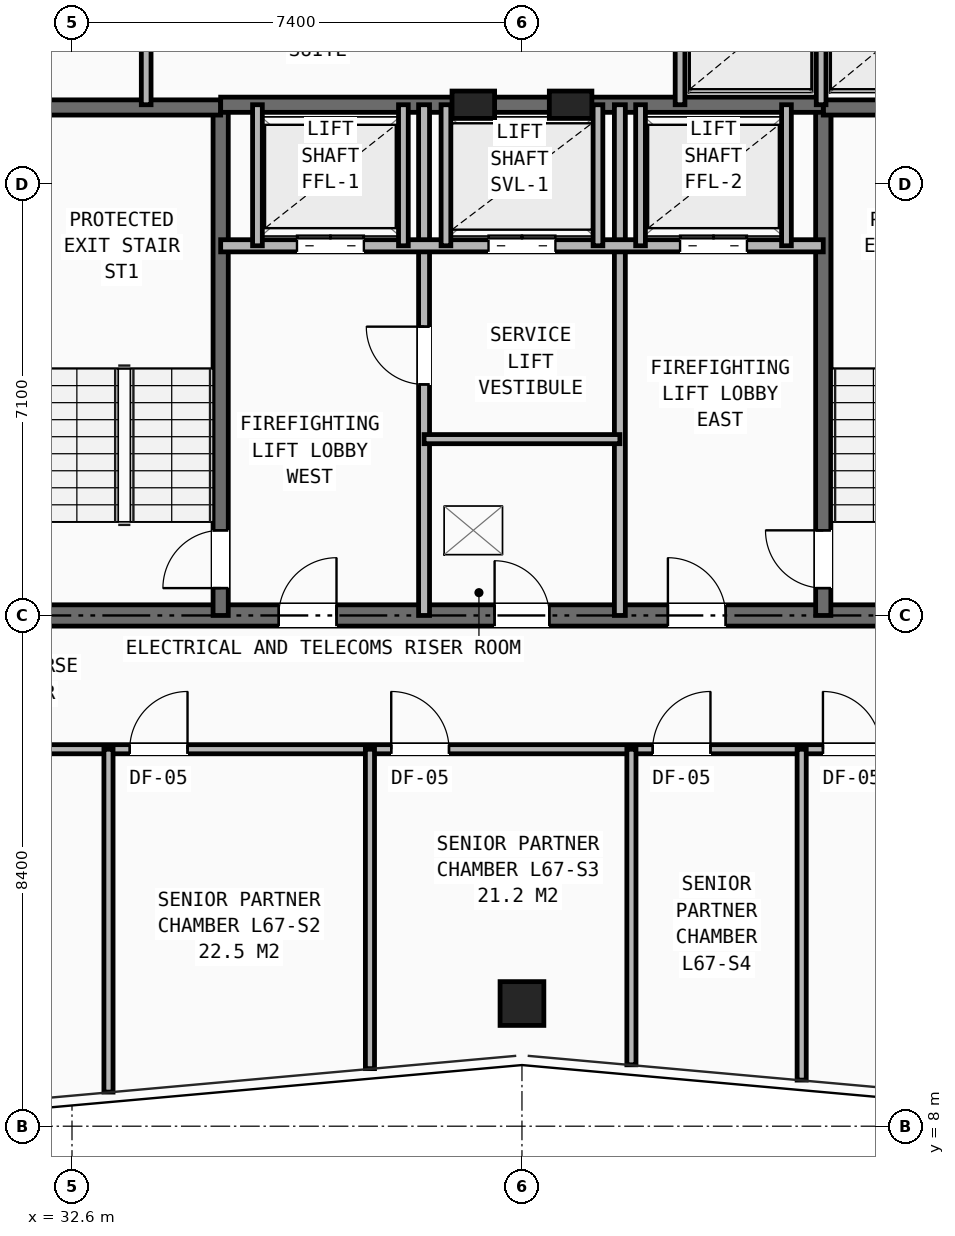
"""IFC4 building model, lengths in metres.
Left out: names, types, materials, properties, quantities, classifications, styles, units other than length and angle.
Written with IfcOpenShell. Run it as: python <this file> out.ifc"""

import sys

from ifc_helpers import new_model, si_unit, direction, frame, frame_2d, origin, origin_2d, place, context, subcontext, project, spatial, rectangle, hollow_rectangle, extrude, element, fill, save


model = new_model("IFC4")
c1 = context("Model", 3, precision=1e-05, world=origin(), true_north=direction((0.0, 1.0)))
c2 = subcontext(c1, "Body", "Model", "MODEL_VIEW")
j1 = project(units=[si_unit("LENGTHUNIT", "METRE"), si_unit("PLANEANGLEUNIT", "RADIAN")], contexts=[c1])
p1 = place(None, origin())
s1 = spatial("IfcSite", under=j1, at=p1, CompositionType="ELEMENT")
p2 = place(p1, origin())
s2 = spatial("IfcBuilding", under=s1, at=p2, CompositionType="ELEMENT")
p3 = place(p2, frame((0.0, 0.0, 236.4)))
s3 = spatial("IfcBuildingStorey", under=s2, at=p3, CompositionType="ELEMENT", Elevation=236.4)
for number, where, z_axis, x_axis in (
    (1, (39.2, 24.8, 0.0), (0.0, 0.0, 1.0), (1.0, 0.0, 0.0)),
    (2, (40.8, 24.8, 0.0), (0.0, 0.0, 1.0), (1.0, 0.0, 0.0)),
):
    element("IfcColumn", number, at=place(p3, frame(where, z_axis=z_axis, x_axis=x_axis)), inside=s3, PredefinedType="PILASTER", context=c2, shape_type="SweptSolid", body=[
        extrude(rectangle(XDim=0.7, YDim=0.45, at=origin_2d()), origin(), (0.0, 0.0, 1.0), 3.5),
    ])
p4 = place(p3, frame((40.0, 10.018, 0.0), z_axis=(0.0, 0.0, 1.0), x_axis=(1.0, 0.0, 0.0)))
e3 = element("IfcColumn", 3, at=p4, inside=s3, PredefinedType="COLUMN", context=c2, shape_type="SweptSolid", body=[
    extrude(hollow_rectangle(XDim=0.72, YDim=0.72, WallThickness=0.05, at=origin_2d()), origin(), (0.0, 0.0, 1.0), 3.5),
])
p5 = place(p3, frame((31.8, 16.4, 0.0), z_axis=(0.0, 0.0, 1.0), x_axis=(1.0, 0.0, 0.0)))
e4 = element("IfcWall", 4, at=p5, inside=s3, PredefinedType="SHEAR", context=c2, shape_type="SweptSolid", body=[
    extrude(rectangle(XDim=16.4, YDim=0.35, at=frame_2d((8.2, 0.0))), origin(), (0.0, 0.0, 1.0), 3.25),
])
p6 = place(p5, frame((7.75, 0.0, 0.0)))
e5 = element("IfcOpeningElement", 5, at=p6, cuts=e4, PredefinedType="OPENING", context=c2, shape_type="SweptSolid", body=[
    extrude(rectangle(XDim=0.9, YDim=2.1, at=frame_2d((0.45, 1.05))), frame((0.0, 0.185, 0.0), z_axis=(0.0, -1.0, 0.0), x_axis=(1.0, 0.0, 0.0)), (0.0, 0.0, 1.0), 0.37),
])
p7 = place(p5, frame((4.2, 0.0, 0.0)))
e6 = element("IfcOpeningElement", 6, at=p7, cuts=e4, PredefinedType="OPENING", context=c2, shape_type="SweptSolid", body=[
    extrude(rectangle(XDim=0.95, YDim=2.1, at=frame_2d((0.475, 1.05))), frame((0.0, 0.185, 0.0), z_axis=(0.0, -1.0, 0.0), x_axis=(1.0, 0.0, 0.0)), (0.0, 0.0, 1.0), 0.37),
])
p8 = place(p5, frame((10.6, 0.0, 0.0)))
e7 = element("IfcOpeningElement", 7, at=p8, cuts=e4, PredefinedType="OPENING", context=c2, shape_type="SweptSolid", body=[
    extrude(rectangle(XDim=0.95, YDim=2.1, at=frame_2d((0.475, 1.05))), frame((0.0, 0.185, 0.0), z_axis=(0.0, -1.0, 0.0), x_axis=(1.0, 0.0, 0.0)), (0.0, 0.0, 1.0), 0.37),
])
p9 = place(p3, frame((35.045, 16.4, 0.0), z_axis=(0.0, 0.0, 1.0), x_axis=(0.0, 1.0, 0.0)))
e8 = element("IfcWall", 8, at=p9, inside=s3, PredefinedType="SHEAR", context=c2, shape_type="SweptSolid", body=[
    extrude(rectangle(XDim=8.4, YDim=0.25, at=frame_2d((4.2, 0.0))), origin(), (0.0, 0.0, 1.0), 3.25),
])
p10 = place(p9, frame((0.45, 0.0, 0.0)))
e9 = element("IfcOpeningElement", 9, at=p10, cuts=e8, PredefinedType="OPENING", context=c2, shape_type="SweptSolid", body=[
    extrude(rectangle(XDim=0.95, YDim=2.1, at=frame_2d((0.475, 1.05))), frame((0.0, 0.135, 0.0), z_axis=(0.0, -1.0, 0.0), x_axis=(1.0, 0.0, 0.0)), (0.0, 0.0, 1.0), 0.27),
])
p11 = place(p3, frame((31.8, 24.755, 0.0), z_axis=(0.0, 0.0, 1.0), x_axis=(1.0, 0.0, 0.0)))
e10 = element("IfcWall", 10, at=p11, inside=s3, PredefinedType="SHEAR", context=c2, shape_type="SweptSolid", body=[
    extrude(rectangle(XDim=3.245, YDim=0.25, at=frame_2d((1.623, 0.0))), origin(), (0.0, 0.0, 1.0), 3.25),
])
p12 = place(p3, frame((44.955, 16.4, 0.0), z_axis=(0.0, 0.0, 1.0), x_axis=(0.0, 1.0, 0.0)))
e11 = element("IfcWall", 11, at=p12, inside=s3, PredefinedType="SHEAR", context=c2, shape_type="SweptSolid", body=[
    extrude(rectangle(XDim=8.4, YDim=0.25, at=frame_2d((4.2, 0.0))), origin(), (0.0, 0.0, 1.0), 3.25),
])
p13 = place(p12, frame((0.45, 0.0, 0.0)))
e12 = element("IfcOpeningElement", 12, at=p13, cuts=e11, PredefinedType="OPENING", context=c2, shape_type="SweptSolid", body=[
    extrude(rectangle(XDim=0.95, YDim=2.1, at=frame_2d((0.475, 1.05))), frame((0.0, 0.135, 0.0), z_axis=(0.0, -1.0, 0.0), x_axis=(1.0, 0.0, 0.0)), (0.0, 0.0, 1.0), 0.27),
])
p14 = place(p3, frame((44.955, 24.755, 0.0), z_axis=(0.0, 0.0, 1.0), x_axis=(1.0, 0.0, 0.0)))
e13 = element("IfcWall", 13, at=p14, inside=s3, PredefinedType="SHEAR", context=c2, shape_type="SweptSolid", body=[
    extrude(rectangle(XDim=3.245, YDim=0.25, at=frame_2d((1.623, 0.0))), origin(), (0.0, 0.0, 1.0), 3.25),
])
p15 = place(p3, frame((35.045, 24.8, 0.0), z_axis=(0.0, 0.0, 1.0), x_axis=(1.0, 0.0, 0.0)))
e14 = element("IfcWall", 14, at=p15, inside=s3, PredefinedType="SHEAR", context=c2, shape_type="SweptSolid", body=[
    extrude(rectangle(XDim=9.91, YDim=0.25, at=frame_2d((4.955, 0.0))), origin(), (0.0, 0.0, 1.0), 3.25),
])
p16 = place(p3, frame((38.39, 16.4, 0.0), z_axis=(0.0, 0.0, 1.0), x_axis=(0.0, 1.0, 0.0)))
e15 = element("IfcWall", 15, at=p16, inside=s3, PredefinedType="PARTITIONING", context=c2, shape_type="SweptSolid", body=[
    extrude(rectangle(XDim=8.4, YDim=0.18, at=frame_2d((4.2, 0.0))), origin(), (0.0, 0.0, 1.0), 2.705),
])
p17 = place(p16, frame((3.8, 0.0, 0.0)))
e16 = element("IfcOpeningElement", 16, at=p17, cuts=e15, PredefinedType="OPENING", context=c2, shape_type="SweptSolid", body=[
    extrude(rectangle(XDim=0.95, YDim=2.1, at=frame_2d((0.475, 1.05))), frame((0.0, 0.1, 0.0), z_axis=(0.0, -1.0, 0.0), x_axis=(1.0, 0.0, 0.0)), (0.0, 0.0, 1.0), 0.2),
])
p18 = place(p3, frame((41.61, 16.4, 0.0), z_axis=(0.0, 0.0, 1.0), x_axis=(0.0, 1.0, 0.0)))
e17 = element("IfcWall", 17, at=p18, inside=s3, PredefinedType="PARTITIONING", context=c2, shape_type="SweptSolid", body=[
    extrude(rectangle(XDim=8.4, YDim=0.18, at=frame_2d((4.2, 0.0))), origin(), (0.0, 0.0, 1.0), 2.705),
])
p19 = place(p3, frame((35.045, 22.48, 0.0), z_axis=(0.0, 0.0, 1.0), x_axis=(1.0, 0.0, 0.0)))
e18 = element("IfcWall", 18, at=p19, inside=s3, PredefinedType="SOLIDWALL", context=c2, shape_type="SweptSolid", body=[
    extrude(rectangle(XDim=9.91, YDim=0.2, at=frame_2d((4.955, 0.0))), origin(), (0.0, 0.0, 1.0), 3.25),
])
p20 = place(p19, frame((1.255, 0.0, 0.0)))
e19 = element("IfcOpeningElement", 19, at=p20, cuts=e18, PredefinedType="OPENING", context=c2, shape_type="SweptSolid", body=[
    extrude(rectangle(XDim=1.1, YDim=2.15, at=frame_2d((0.55, 1.075))), frame((0.0, 0.11, 0.0), z_axis=(0.0, -1.0, 0.0), x_axis=(1.0, 0.0, 0.0)), (0.0, 0.0, 1.0), 0.22),
])
p21 = place(p19, frame((7.555, 0.0, 0.0)))
e20 = element("IfcOpeningElement", 20, at=p21, cuts=e18, PredefinedType="OPENING", context=c2, shape_type="SweptSolid", body=[
    extrude(rectangle(XDim=1.1, YDim=2.15, at=frame_2d((0.55, 1.075))), frame((0.0, 0.11, 0.0), z_axis=(0.0, -1.0, 0.0), x_axis=(1.0, 0.0, 0.0)), (0.0, 0.0, 1.0), 0.22),
])
p22 = place(p19, frame((4.405, 0.0, 0.0)))
e21 = element("IfcOpeningElement", 21, at=p22, cuts=e18, PredefinedType="OPENING", context=c2, shape_type="SweptSolid", body=[
    extrude(rectangle(XDim=1.1, YDim=2.15, at=frame_2d((0.55, 1.075))), frame((0.0, 0.11, 0.0), z_axis=(0.0, -1.0, 0.0), x_axis=(1.0, 0.0, 0.0)), (0.0, 0.0, 1.0), 0.22),
])
p23 = place(p3, frame((38.39, 19.3, 0.0), z_axis=(0.0, 0.0, 1.0), x_axis=(1.0, 0.0, 0.0)))
e22 = element("IfcWall", 22, at=p23, inside=s3, PredefinedType="PARTITIONING", context=c2, shape_type="SweptSolid", body=[
    extrude(rectangle(XDim=3.22, YDim=0.15, at=frame_2d((1.61, 0.0))), origin(), (0.0, 0.0, 1.0), 3.25),
])
for number, where, z_axis, x_axis in (
    (23, (35.65, 22.48, 0.0), (0.0, 0.0, 1.0), (0.0, 1.0, 0.0)),
    (24, (38.05, 22.48, 0.0), (0.0, 0.0, 1.0), (0.0, 1.0, 0.0)),
    (25, (41.95, 22.48, 0.0), (0.0, 0.0, 1.0), (0.0, 1.0, 0.0)),
    (26, (44.35, 22.48, 0.0), (0.0, 0.0, 1.0), (0.0, 1.0, 0.0)),
    (27, (38.75, 22.48, 0.0), (0.0, 0.0, 1.0), (0.0, 1.0, 0.0)),
    (28, (41.25, 22.48, 0.0), (0.0, 0.0, 1.0), (0.0, 1.0, 0.0)),
):
    element("IfcWall", number, at=place(p3, frame(where, z_axis=z_axis, x_axis=x_axis)), inside=s3, PredefinedType="SOLIDWALL", context=c2, shape_type="SweptSolid", body=[
        extrude(rectangle(XDim=2.32, YDim=0.16, at=frame_2d((1.16, 0.0))), origin(), (0.0, 0.0, 1.0), 3.25),
    ])
for number, where, z_axis, x_axis in (
    (29, (33.82, 24.8, 0.0), (0.0, 0.0, 1.0), (0.0, 1.0, 0.0)),
    (30, (42.6, 24.8, 0.0), (0.0, 0.0, 1.0), (0.0, 1.0, 0.0)),
    (31, (44.92, 24.8, 0.0), (0.0, 0.0, 1.0), (0.0, 1.0, 0.0)),
):
    element("IfcWall", number, at=place(p3, frame(where, z_axis=z_axis, x_axis=x_axis)), inside=s3, PredefinedType="SOLIDWALL", context=c2, shape_type="SweptSolid", body=[
        extrude(rectangle(XDim=2.08, YDim=0.16, at=frame_2d((1.04, 0.0))), origin(), (0.0, 0.0, 1.0), 3.25),
    ])
p24 = place(p3, frame((25.5, 14.2, 0.0), z_axis=(0.0, 0.0, 1.0), x_axis=(1.0, 0.0, 0.0)))
e32 = element("IfcWall", 32, at=p24, inside=s3, PredefinedType="PARTITIONING", context=c2, shape_type="SweptSolid", body=[
    extrude(rectangle(XDim=29.0, YDim=0.15, at=frame_2d((14.5, 0.0))), origin(), (0.0, 0.0, 1.0), 2.292),
])
p25 = place(p24, frame((0.85, 0.0, 0.0)))
e33 = element("IfcOpeningElement", 33, at=p25, cuts=e32, PredefinedType="OPENING", context=c2, shape_type="SweptSolid", body=[
    extrude(rectangle(XDim=0.95, YDim=2.1, at=frame_2d((0.475, 1.05))), frame((0.0, 0.085, 0.0), z_axis=(0.0, -1.0, 0.0), x_axis=(1.0, 0.0, 0.0)), (0.0, 0.0, 1.0), 0.17),
])
p26 = place(p24, frame((8.05, 0.0, 0.0)))
e34 = element("IfcOpeningElement", 34, at=p26, cuts=e32, PredefinedType="OPENING", context=c2, shape_type="SweptSolid", body=[
    extrude(rectangle(XDim=0.95, YDim=2.1, at=frame_2d((0.475, 1.05))), frame((0.0, 0.085, 0.0), z_axis=(0.0, -1.0, 0.0), x_axis=(1.0, 0.0, 0.0)), (0.0, 0.0, 1.0), 0.17),
])
p27 = place(p24, frame((12.35, 0.0, 0.0)))
e35 = element("IfcOpeningElement", 35, at=p27, cuts=e32, PredefinedType="OPENING", context=c2, shape_type="SweptSolid", body=[
    extrude(rectangle(XDim=0.95, YDim=2.1, at=frame_2d((0.475, 1.05))), frame((0.0, 0.085, 0.0), z_axis=(0.0, -1.0, 0.0), x_axis=(1.0, 0.0, 0.0)), (0.0, 0.0, 1.0), 0.17),
])
p28 = place(p24, frame((16.65, 0.0, 0.0)))
e36 = element("IfcOpeningElement", 36, at=p28, cuts=e32, PredefinedType="OPENING", context=c2, shape_type="SweptSolid", body=[
    extrude(rectangle(XDim=0.95, YDim=2.1, at=frame_2d((0.475, 1.05))), frame((0.0, 0.085, 0.0), z_axis=(0.0, -1.0, 0.0), x_axis=(1.0, 0.0, 0.0)), (0.0, 0.0, 1.0), 0.17),
])
p29 = place(p24, frame((19.45, 0.0, 0.0)))
e37 = element("IfcOpeningElement", 37, at=p29, cuts=e32, PredefinedType="OPENING", context=c2, shape_type="SweptSolid", body=[
    extrude(rectangle(XDim=0.95, YDim=2.1, at=frame_2d((0.475, 1.05))), frame((0.0, 0.085, 0.0), z_axis=(0.0, -1.0, 0.0), x_axis=(1.0, 0.0, 0.0)), (0.0, 0.0, 1.0), 0.17),
])
p30 = place(p3, frame((33.2, 8.561, 0.0), z_axis=(0.0, 0.0, 1.0), x_axis=(0.0, 1.0, 0.0)))
e38 = element("IfcWall", 38, at=p30, inside=s3, PredefinedType="PARTITIONING", context=c2, shape_type="SweptSolid", body=[
    extrude(rectangle(XDim=5.639, YDim=0.15, at=frame_2d((2.82, 0.0))), origin(), (0.0, 0.0, 1.0), 2.628),
])
p31 = place(p3, frame((37.5, 8.947, 0.0), z_axis=(0.0, 0.0, 1.0), x_axis=(0.0, 1.0, 0.0)))
e39 = element("IfcWall", 39, at=p31, inside=s3, PredefinedType="PARTITIONING", context=c2, shape_type="SweptSolid", body=[
    extrude(rectangle(XDim=5.253, YDim=0.15, at=frame_2d((2.626, 0.0))), origin(), (0.0, 0.0, 1.0), 2.292),
])
p32 = place(p3, frame((41.8, 9.01, 0.0), z_axis=(0.0, 0.0, 1.0), x_axis=(0.0, 1.0, 0.0)))
e40 = element("IfcWall", 40, at=p32, inside=s3, PredefinedType="PARTITIONING", context=c2, shape_type="SweptSolid", body=[
    extrude(rectangle(XDim=5.19, YDim=0.15, at=frame_2d((2.595, 0.0))), origin(), (0.0, 0.0, 1.0), 2.628),
])
p33 = place(p3, frame((44.6, 8.758, 0.0), z_axis=(0.0, 0.0, 1.0), x_axis=(0.0, 1.0, 0.0)))
e41 = element("IfcWall", 41, at=p33, inside=s3, PredefinedType="PARTITIONING", context=c2, shape_type="SweptSolid", body=[
    extrude(rectangle(XDim=5.442, YDim=0.15, at=frame_2d((2.721, 0.0))), origin(), (0.0, 0.0, 1.0), 2.628),
])
p34 = place(p6, origin())
e42 = element("IfcDoor", 42, at=p34, inside=s3, OperationType="SINGLE_SWING_LEFT", PredefinedType="DOOR", context=c2, shape_type="SweptSolid", body=[
    extrude(rectangle(XDim=0.9, YDim=2.1, at=frame_2d((0.45, 1.05))), frame((0.0, 0.025, 0.0), z_axis=(0.0, -1.0, 0.0), x_axis=(1.0, 0.0, 0.0)), (0.0, 0.0, 1.0), 0.05),
])
fill(e5, e42)
p35 = place(p17, origin())
e43 = element("IfcDoor", 43, at=p35, inside=s3, OperationType="SINGLE_SWING_RIGHT", PredefinedType="DOOR", context=c2, shape_type="SweptSolid", body=[
    extrude(rectangle(XDim=0.95, YDim=2.1, at=frame_2d((0.475, 1.05))), frame((0.0, 0.025, 0.0), z_axis=(0.0, -1.0, 0.0), x_axis=(1.0, 0.0, 0.0)), (0.0, 0.0, 1.0), 0.05),
])
fill(e16, e43)
p36 = place(p10, origin())
e44 = element("IfcDoor", 44, at=p36, inside=s3, OperationType="SINGLE_SWING_LEFT", PredefinedType="DOOR", context=c2, shape_type="SweptSolid", body=[
    extrude(rectangle(XDim=0.95, YDim=2.1, at=frame_2d((0.475, 1.05))), frame((0.0, 0.025, 0.0), z_axis=(0.0, -1.0, 0.0), x_axis=(1.0, 0.0, 0.0)), (0.0, 0.0, 1.0), 0.05),
])
fill(e9, e44)
p37 = place(p13, origin())
e45 = element("IfcDoor", 45, at=p37, inside=s3, OperationType="SINGLE_SWING_RIGHT", PredefinedType="DOOR", context=c2, shape_type="SweptSolid", body=[
    extrude(rectangle(XDim=0.95, YDim=2.1, at=frame_2d((0.475, 1.05))), frame((0.0, 0.025, 0.0), z_axis=(0.0, -1.0, 0.0), x_axis=(1.0, 0.0, 0.0)), (0.0, 0.0, 1.0), 0.05),
])
fill(e12, e45)
p38 = place(p7, origin())
e46 = element("IfcDoor", 46, at=p38, inside=s3, OperationType="SINGLE_SWING_RIGHT", PredefinedType="DOOR", context=c2, shape_type="SweptSolid", body=[
    extrude(rectangle(XDim=0.95, YDim=2.1, at=frame_2d((0.475, 1.05))), frame((0.0, 0.025, 0.0), z_axis=(0.0, -1.0, 0.0), x_axis=(1.0, 0.0, 0.0)), (0.0, 0.0, 1.0), 0.05),
])
fill(e6, e46)
p39 = place(p8, origin())
e47 = element("IfcDoor", 47, at=p39, inside=s3, OperationType="SINGLE_SWING_LEFT", PredefinedType="DOOR", context=c2, shape_type="SweptSolid", body=[
    extrude(rectangle(XDim=0.95, YDim=2.1, at=frame_2d((0.475, 1.05))), frame((0.0, 0.025, 0.0), z_axis=(0.0, -1.0, 0.0), x_axis=(1.0, 0.0, 0.0)), (0.0, 0.0, 1.0), 0.05),
])
fill(e7, e47)
p40 = place(p20, origin())
e48 = element("IfcDoor", 48, at=p40, inside=s3, OperationType="DOUBLE_DOOR_SLIDING", PredefinedType="DOOR", context=c2, shape_type="SweptSolid", body=[
    extrude(rectangle(XDim=1.1, YDim=2.15, at=frame_2d((0.55, 1.075))), frame((0.0, 0.025, 0.0), z_axis=(0.0, -1.0, 0.0), x_axis=(1.0, 0.0, 0.0)), (0.0, 0.0, 1.0), 0.05),
])
fill(e19, e48)
p41 = place(p21, origin())
e49 = element("IfcDoor", 49, at=p41, inside=s3, OperationType="DOUBLE_DOOR_SLIDING", PredefinedType="DOOR", context=c2, shape_type="SweptSolid", body=[
    extrude(rectangle(XDim=1.1, YDim=2.15, at=frame_2d((0.55, 1.075))), frame((0.0, 0.025, 0.0), z_axis=(0.0, -1.0, 0.0), x_axis=(1.0, 0.0, 0.0)), (0.0, 0.0, 1.0), 0.05),
])
fill(e20, e49)
p42 = place(p22, origin())
e50 = element("IfcDoor", 50, at=p42, inside=s3, OperationType="DOUBLE_DOOR_SLIDING", PredefinedType="DOOR", context=c2, shape_type="SweptSolid", body=[
    extrude(rectangle(XDim=1.1, YDim=2.15, at=frame_2d((0.55, 1.075))), frame((0.0, 0.025, 0.0), z_axis=(0.0, -1.0, 0.0), x_axis=(1.0, 0.0, 0.0)), (0.0, 0.0, 1.0), 0.05),
])
fill(e21, e50)
p43 = place(p26, origin())
e51 = element("IfcDoor", 51, at=p43, inside=s3, OperationType="SINGLE_SWING_RIGHT", PredefinedType="DOOR", context=c2, shape_type="SweptSolid", body=[
    extrude(rectangle(XDim=0.95, YDim=2.1, at=frame_2d((0.475, 1.05))), frame((0.0, 0.025, 0.0), z_axis=(0.0, -1.0, 0.0), x_axis=(1.0, 0.0, 0.0)), (0.0, 0.0, 1.0), 0.05),
])
fill(e34, e51)
p44 = place(p27, origin())
e52 = element("IfcDoor", 52, at=p44, inside=s3, OperationType="SINGLE_SWING_LEFT", PredefinedType="DOOR", context=c2, shape_type="SweptSolid", body=[
    extrude(rectangle(XDim=0.95, YDim=2.1, at=frame_2d((0.475, 1.05))), frame((0.0, 0.025, 0.0), z_axis=(0.0, -1.0, 0.0), x_axis=(1.0, 0.0, 0.0)), (0.0, 0.0, 1.0), 0.05),
])
fill(e35, e52)
p45 = place(p28, origin())
e53 = element("IfcDoor", 53, at=p45, inside=s3, OperationType="SINGLE_SWING_RIGHT", PredefinedType="DOOR", context=c2, shape_type="SweptSolid", body=[
    extrude(rectangle(XDim=0.95, YDim=2.1, at=frame_2d((0.475, 1.05))), frame((0.0, 0.025, 0.0), z_axis=(0.0, -1.0, 0.0), x_axis=(1.0, 0.0, 0.0)), (0.0, 0.0, 1.0), 0.05),
])
fill(e36, e53)
p46 = place(p29, origin())
e54 = element("IfcDoor", 54, at=p46, inside=s3, OperationType="SINGLE_SWING_LEFT", PredefinedType="DOOR", context=c2, shape_type="SweptSolid", body=[
    extrude(rectangle(XDim=0.95, YDim=2.1, at=frame_2d((0.475, 1.05))), frame((0.0, 0.025, 0.0), z_axis=(0.0, -1.0, 0.0), x_axis=(1.0, 0.0, 0.0)), (0.0, 0.0, 1.0), 0.05),
])
fill(e37, e54)
save(model, sys.argv[1])
